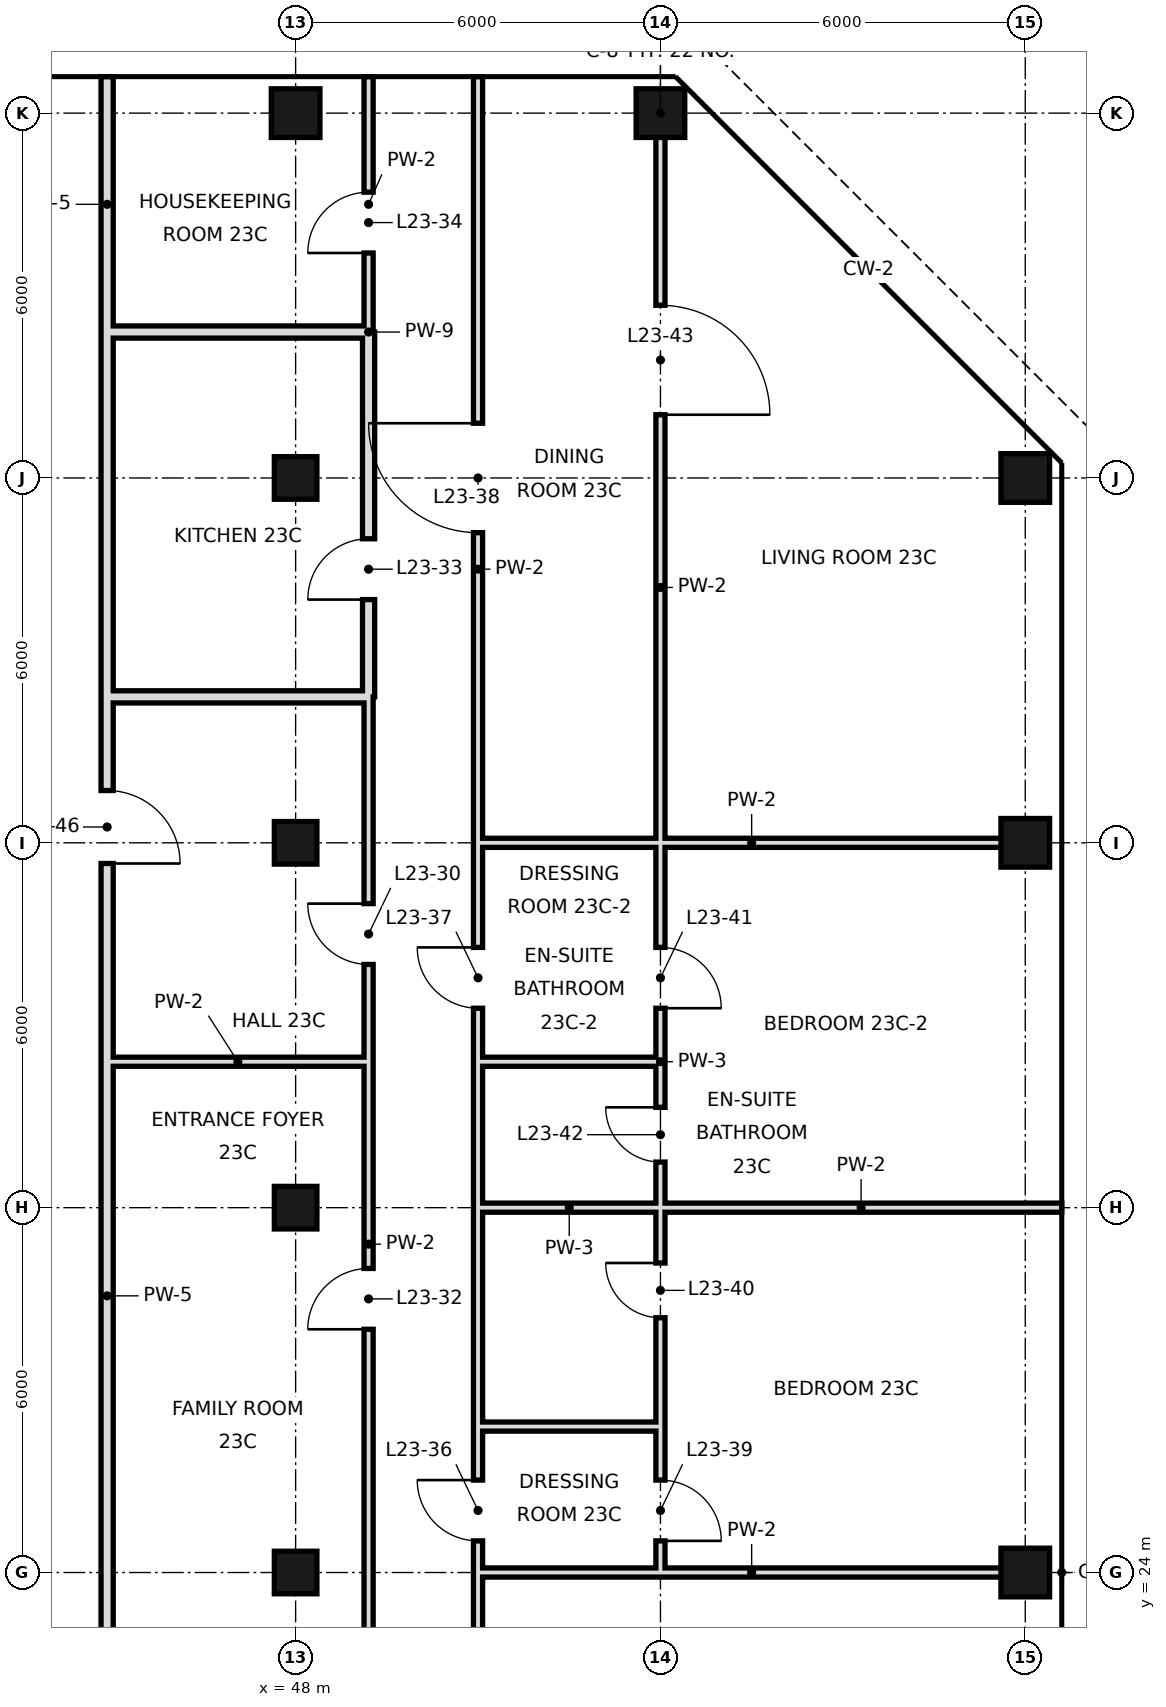
"""IFC4 building model, lengths in metres.
Left out: names, types, materials, properties, quantities, classifications, styles, units other than length and angle.
Written with IfcOpenShell. Run it as: python <this file> out.ifc"""

import sys

from ifc_helpers import new_model, si_unit, direction, frame, frame_2d, origin, origin_2d, place, context, subcontext, project, spatial, rectangle, hollow_rectangle, extrude, element, fill, save


model = new_model("IFC4")
c1 = context("Model", 3, precision=1e-05, world=origin(), true_north=direction((0.0, 1.0)))
c2 = subcontext(c1, "Body", "Model", "MODEL_VIEW")
j1 = project(units=[si_unit("LENGTHUNIT", "METRE"), si_unit("PLANEANGLEUNIT", "RADIAN")], contexts=[c1])
p1 = place(None, origin())
s1 = spatial("IfcSite", under=j1, at=p1, CompositionType="ELEMENT")
p2 = place(p1, origin())
s2 = spatial("IfcBuilding", under=s1, at=p2, CompositionType="ELEMENT")
p3 = place(p2, frame((0.0, 0.0, 107.0)))
s3 = spatial("IfcBuildingStorey", under=s2, at=p3, CompositionType="ELEMENT", Elevation=107.0)
for number, where, z_axis, x_axis in (
    (1, (48.0, 24.0, 0.0), (0.0, 0.0, 1.0), (1.0, 0.0, 0.0)),
    (2, (48.0, 30.0, 0.0), (0.0, 0.0, 1.0), (1.0, 0.0, 0.0)),
    (3, (48.0, 36.0, 0.0), (0.0, 0.0, 1.0), (1.0, 0.0, 0.0)),
    (4, (48.0, 42.0, 0.0), (0.0, 0.0, 1.0), (1.0, 0.0, 0.0)),
):
    element("IfcColumn", number, at=place(p3, frame(where, z_axis=z_axis, x_axis=x_axis)), inside=s3, PredefinedType="COLUMN", context=c2, shape_type="SweptSolid", body=[
        extrude(hollow_rectangle(XDim=0.7, YDim=0.7, WallThickness=0.036, at=origin_2d()), origin(), (0.0, 0.0, 1.0), 3.6),
    ])
for number, where, z_axis, x_axis in (
    (5, (48.0, 48.0, 0.0), (0.0, 0.0, 1.0), (1.0, 0.0, 0.0)),
    (6, (54.0, 48.0, 0.0), (0.0, 0.0, 1.0), (1.0, 0.0, 0.0)),
    (7, (60.0, 24.0, 0.0), (0.0, 0.0, 1.0), (1.0, 0.0, 0.0)),
    (8, (60.0, 36.0, 0.0), (0.0, 0.0, 1.0), (1.0, 0.0, 0.0)),
    (9, (60.0, 42.0, 0.0), (0.0, 0.0, 1.0), (1.0, 0.0, 0.0)),
):
    element("IfcColumn", number, at=place(p3, frame(where, z_axis=z_axis, x_axis=x_axis)), inside=s3, PredefinedType="COLUMN", context=c2, shape_type="SweptSolid", body=[
        extrude(hollow_rectangle(XDim=0.8, YDim=0.8, WallThickness=0.04, at=origin_2d()), origin(), (0.0, 0.0, 1.0), 3.6),
    ])
p4 = place(p3, frame((44.9, 18.7, 0.0), z_axis=(0.0, 0.0, 1.0), x_axis=(0.0, 1.0, 0.0)))
e10 = element("IfcWall", 10, at=p4, inside=s3, PredefinedType="SOLIDWALL", context=c2, shape_type="SweptSolid", body=[
    extrude(rectangle(XDim=19.7, YDim=0.2, at=frame_2d((9.85, 0.0))), origin(), (0.0, 0.0, 1.0), 2.97),
])
p5 = place(p4, frame((16.96, 0.0, 0.0)))
e11 = element("IfcOpeningElement", 11, at=p5, cuts=e10, PredefinedType="OPENING", context=c2, shape_type="SweptSolid", body=[
    extrude(rectangle(XDim=1.2, YDim=2.4, at=frame_2d((0.6, 1.2))), frame((0.0, 0.11, 0.0), z_axis=(0.0, -1.0, 0.0), x_axis=(1.0, 0.0, 0.0)), (0.0, 0.0, 1.0), 0.22),
])
p6 = place(p3, frame((44.9, 44.4, 0.0), z_axis=(0.0, 0.0, 1.0), x_axis=(0.0, 1.0, 0.0)))
e12 = element("IfcWall", 12, at=p6, inside=s3, PredefinedType="SOLIDWALL", context=c2, shape_type="SweptSolid", body=[
    extrude(rectangle(XDim=4.2, YDim=0.2, at=frame_2d((2.1, 0.0))), origin(), (0.0, 0.0, 1.0), 2.72),
])
p7 = place(p3, frame((44.9, 38.4, 0.0), z_axis=(0.0, 0.0, 1.0), x_axis=(0.0, 1.0, 0.0)))
e13 = element("IfcWall", 13, at=p7, inside=s3, PredefinedType="SOLIDWALL", context=c2, shape_type="SweptSolid", body=[
    extrude(rectangle(XDim=6.0, YDim=0.2, at=frame_2d((3.0, 0.0))), origin(), (0.0, 0.0, 1.0), 2.97),
])
p8 = place(p3, frame((49.2, 38.4, 0.0), z_axis=(0.0, 0.0, 1.0), x_axis=(0.0, 1.0, 0.0)))
e14 = element("IfcWall", 14, at=p8, inside=s3, PredefinedType="SOLIDWALL", context=c2, shape_type="SweptSolid", body=[
    extrude(rectangle(XDim=6.0, YDim=0.2, at=frame_2d((3.0, 0.0))), origin(), (0.0, 0.0, 1.0), 2.72),
])
p9 = place(p8, frame((1.6, 0.0, 0.0)))
e15 = element("IfcOpeningElement", 15, at=p9, cuts=e14, PredefinedType="OPENING", context=c2, shape_type="SweptSolid", body=[
    extrude(rectangle(XDim=1.0, YDim=2.4, at=frame_2d((0.5, 1.2))), frame((0.0, 0.11, 0.0), z_axis=(0.0, -1.0, 0.0), x_axis=(1.0, 0.0, 0.0)), (0.0, 0.0, 1.0), 0.22),
])
p10 = place(p3, frame((49.2, 20.4, 0.0), z_axis=(0.0, 0.0, 1.0), x_axis=(0.0, 1.0, 0.0)))
e16 = element("IfcWall", 16, at=p10, inside=s3, PredefinedType="PARTITIONING", context=c2, shape_type="SweptSolid", body=[
    extrude(rectangle(XDim=18.0, YDim=0.15, at=frame_2d((9.0, 0.0))), origin(), (0.0, 0.0, 1.0), 3.42),
])
p11 = place(p10, frame((13.6, 0.0, 0.0)))
e17 = element("IfcOpeningElement", 17, at=p11, cuts=e16, PredefinedType="OPENING", context=c2, shape_type="SweptSolid", body=[
    extrude(rectangle(XDim=1.0, YDim=2.4, at=frame_2d((0.5, 1.2))), frame((0.0, 0.085, 0.0), z_axis=(0.0, -1.0, 0.0), x_axis=(1.0, 0.0, 0.0)), (0.0, 0.0, 1.0), 0.17),
])
p12 = place(p10, frame((7.6, 0.0, 0.0)))
e18 = element("IfcOpeningElement", 18, at=p12, cuts=e16, PredefinedType="OPENING", context=c2, shape_type="SweptSolid", body=[
    extrude(rectangle(XDim=1.0, YDim=2.4, at=frame_2d((0.5, 1.2))), frame((0.0, 0.085, 0.0), z_axis=(0.0, -1.0, 0.0), x_axis=(1.0, 0.0, 0.0)), (0.0, 0.0, 1.0), 0.17),
])
p13 = place(p3, frame((49.2, 44.4, 0.0), z_axis=(0.0, 0.0, 1.0), x_axis=(0.0, 1.0, 0.0)))
e19 = element("IfcWall", 19, at=p13, inside=s3, PredefinedType="PARTITIONING", context=c2, shape_type="SweptSolid", body=[
    extrude(rectangle(XDim=4.2, YDim=0.15, at=frame_2d((2.1, 0.0))), origin(), (0.0, 0.0, 1.0), 3.42),
])
p14 = place(p13, frame((1.3, 0.0, 0.0)))
e20 = element("IfcOpeningElement", 20, at=p14, cuts=e19, PredefinedType="OPENING", context=c2, shape_type="SweptSolid", body=[
    extrude(rectangle(XDim=1.0, YDim=2.4, at=frame_2d((0.5, 1.2))), frame((0.0, 0.085, 0.0), z_axis=(0.0, -1.0, 0.0), x_axis=(1.0, 0.0, 0.0)), (0.0, 0.0, 1.0), 0.17),
])
p15 = place(p3, frame((51.0, 18.0, 0.0), z_axis=(0.0, 0.0, 1.0), x_axis=(0.0, 1.0, 0.0)))
e21 = element("IfcWall", 21, at=p15, inside=s3, PredefinedType="PARTITIONING", context=c2, shape_type="SweptSolid", body=[
    extrude(rectangle(XDim=8.4, YDim=0.15, at=frame_2d((4.2, 0.0))), origin(), (0.0, 0.0, 1.0), 3.42),
])
p16 = place(p15, frame((2.5, 0.0, 0.0)))
e22 = element("IfcOpeningElement", 22, at=p16, cuts=e21, PredefinedType="OPENING", context=c2, shape_type="SweptSolid", body=[
    extrude(rectangle(XDim=1.0, YDim=2.4, at=frame_2d((0.5, 1.2))), frame((0.0, 0.085, 0.0), z_axis=(0.0, -1.0, 0.0), x_axis=(1.0, 0.0, 0.0)), (0.0, 0.0, 1.0), 0.17),
])
p17 = place(p15, frame((6.52, 0.0, 0.0)))
e23 = element("IfcOpeningElement", 23, at=p17, cuts=e21, PredefinedType="OPENING", context=c2, shape_type="SweptSolid", body=[
    extrude(rectangle(XDim=1.0, YDim=2.4, at=frame_2d((0.5, 1.2))), frame((0.0, 0.085, 0.0), z_axis=(0.0, -1.0, 0.0), x_axis=(1.0, 0.0, 0.0)), (0.0, 0.0, 1.0), 0.17),
])
p18 = place(p3, frame((51.0, 32.4, 0.0), z_axis=(0.0, 0.0, 1.0), x_axis=(0.0, 1.0, 0.0)))
e24 = element("IfcWall", 24, at=p18, inside=s3, PredefinedType="PARTITIONING", context=c2, shape_type="SweptSolid", body=[
    extrude(rectangle(XDim=16.2, YDim=0.15, at=frame_2d((8.1, 0.0))), origin(), (0.0, 0.0, 1.0), 3.42),
])
p19 = place(p18, frame((0.88, 0.0, 0.0)))
e25 = element("IfcOpeningElement", 25, at=p19, cuts=e24, PredefinedType="OPENING", context=c2, shape_type="SweptSolid", body=[
    extrude(rectangle(XDim=1.0, YDim=2.4, at=frame_2d((0.5, 1.2))), frame((0.0, 0.085, 0.0), z_axis=(0.0, -1.0, 0.0), x_axis=(1.0, 0.0, 0.0)), (0.0, 0.0, 1.0), 0.17),
])
p20 = place(p18, frame((8.7, 0.0, 0.0)))
e26 = element("IfcOpeningElement", 26, at=p20, cuts=e24, PredefinedType="OPENING", context=c2, shape_type="SweptSolid", body=[
    extrude(rectangle(XDim=1.8, YDim=2.4, at=frame_2d((0.9, 1.2))), frame((0.0, 0.085, 0.0), z_axis=(0.0, -1.0, 0.0), x_axis=(1.0, 0.0, 0.0)), (0.0, 0.0, 1.0), 0.17),
])
p21 = place(p3, frame((51.0, 26.4, 0.0), z_axis=(0.0, 0.0, 1.0), x_axis=(0.0, 1.0, 0.0)))
e27 = element("IfcWall", 27, at=p21, inside=s3, PredefinedType="PARTITIONING", context=c2, shape_type="SweptSolid", body=[
    extrude(rectangle(XDim=6.0, YDim=0.15, at=frame_2d((3.0, 0.0))), origin(), (0.0, 0.0, 1.0), 3.42),
])
p22 = place(p3, frame((54.0, 24.0, 0.0), z_axis=(0.0, 0.0, 1.0), x_axis=(0.0, 1.0, 0.0)))
e28 = element("IfcWall", 28, at=p22, inside=s3, PredefinedType="PARTITIONING", context=c2, shape_type="SweptSolid", body=[
    extrude(rectangle(XDim=2.4, YDim=0.15, at=frame_2d((1.2, 0.0))), origin(), (0.0, 0.0, 1.0), 3.42),
])
p23 = place(p22, frame((0.52, 0.0, 0.0)))
e29 = element("IfcOpeningElement", 29, at=p23, cuts=e28, PredefinedType="OPENING", context=c2, shape_type="SweptSolid", body=[
    extrude(rectangle(XDim=1.0, YDim=2.4, at=frame_2d((0.5, 1.2))), frame((0.0, 0.085, 0.0), z_axis=(0.0, -1.0, 0.0), x_axis=(1.0, 0.0, 0.0)), (0.0, 0.0, 1.0), 0.17),
])
p24 = place(p3, frame((54.0, 32.4, 0.0), z_axis=(0.0, 0.0, 1.0), x_axis=(0.0, 1.0, 0.0)))
e30 = element("IfcWall", 30, at=p24, inside=s3, PredefinedType="PARTITIONING", context=c2, shape_type="SweptSolid", body=[
    extrude(rectangle(XDim=15.6, YDim=0.15, at=frame_2d((7.8, 0.0))), origin(), (0.0, 0.0, 1.0), 3.42),
])
p25 = place(p24, frame((0.88, 0.0, 0.0)))
e31 = element("IfcOpeningElement", 31, at=p25, cuts=e30, PredefinedType="OPENING", context=c2, shape_type="SweptSolid", body=[
    extrude(rectangle(XDim=1.0, YDim=2.4, at=frame_2d((0.5, 1.2))), frame((0.0, 0.085, 0.0), z_axis=(0.0, -1.0, 0.0), x_axis=(1.0, 0.0, 0.0)), (0.0, 0.0, 1.0), 0.17),
])
p26 = place(p24, frame((10.64, 0.0, 0.0)))
e32 = element("IfcOpeningElement", 32, at=p26, cuts=e30, PredefinedType="OPENING", context=c2, shape_type="SweptSolid", body=[
    extrude(rectangle(XDim=1.8, YDim=2.4, at=frame_2d((0.9, 1.2))), frame((0.0, 0.085, 0.0), z_axis=(0.0, -1.0, 0.0), x_axis=(1.0, 0.0, 0.0)), (0.0, 0.0, 1.0), 0.17),
])
p27 = place(p3, frame((54.0, 26.4, 0.0), z_axis=(0.0, 0.0, 1.0), x_axis=(0.0, 1.0, 0.0)))
e33 = element("IfcWall", 33, at=p27, inside=s3, PredefinedType="PARTITIONING", context=c2, shape_type="SweptSolid", body=[
    extrude(rectangle(XDim=6.0, YDim=0.15, at=frame_2d((3.0, 0.0))), origin(), (0.0, 0.0, 1.0), 3.42),
])
p28 = place(p27, frame((1.79, 0.0, 0.0)))
e34 = element("IfcOpeningElement", 34, at=p28, cuts=e33, PredefinedType="OPENING", context=c2, shape_type="SweptSolid", body=[
    extrude(rectangle(XDim=0.9, YDim=2.4, at=frame_2d((0.45, 1.2))), frame((0.0, 0.085, 0.0), z_axis=(0.0, -1.0, 0.0), x_axis=(1.0, 0.0, 0.0)), (0.0, 0.0, 1.0), 0.17),
])
p29 = place(p27, frame((4.35, 0.0, 0.0)))
e35 = element("IfcOpeningElement", 35, at=p29, cuts=e33, PredefinedType="OPENING", context=c2, shape_type="SweptSolid", body=[
    extrude(rectangle(XDim=0.9, YDim=2.4, at=frame_2d((0.45, 1.2))), frame((0.0, 0.085, 0.0), z_axis=(0.0, -1.0, 0.0), x_axis=(1.0, 0.0, 0.0)), (0.0, 0.0, 1.0), 0.17),
])
p30 = place(p3, frame((51.0, 24.0, 0.0), z_axis=(0.0, 0.0, 1.0), x_axis=(1.0, 0.0, 0.0)))
e36 = element("IfcWall", 36, at=p30, inside=s3, PredefinedType="PARTITIONING", context=c2, shape_type="SweptSolid", body=[
    extrude(rectangle(XDim=9.0, YDim=0.15, at=frame_2d((4.5, 0.0))), origin(), (0.0, 0.0, 1.0), 2.72),
])
p31 = place(p3, frame((51.0, 26.4, 0.0), z_axis=(0.0, 0.0, 1.0), x_axis=(1.0, 0.0, 0.0)))
e37 = element("IfcWall", 37, at=p31, inside=s3, PredefinedType="PARTITIONING", context=c2, shape_type="SweptSolid", body=[
    extrude(rectangle(XDim=3.0, YDim=0.15, at=frame_2d((1.5, 0.0))), origin(), (0.0, 0.0, 1.0), 3.42),
])
p32 = place(p3, frame((54.0, 30.0, 0.0), z_axis=(0.0, 0.0, 1.0), x_axis=(1.0, 0.0, 0.0)))
e38 = element("IfcWall", 38, at=p32, inside=s3, PredefinedType="PARTITIONING", context=c2, shape_type="SweptSolid", body=[
    extrude(rectangle(XDim=6.6, YDim=0.15, at=frame_2d((3.3, 0.0))), origin(), (0.0, 0.0, 1.0), 2.72),
])
p33 = place(p3, frame((51.0, 30.0, 0.0), z_axis=(0.0, 0.0, 1.0), x_axis=(1.0, 0.0, 0.0)))
e39 = element("IfcWall", 39, at=p33, inside=s3, PredefinedType="PARTITIONING", context=c2, shape_type="SweptSolid", body=[
    extrude(rectangle(XDim=3.0, YDim=0.15, at=frame_2d((1.5, 0.0))), origin(), (0.0, 0.0, 1.0), 2.72),
])
p34 = place(p3, frame((44.9, 32.4, 0.0), z_axis=(0.0, 0.0, 1.0), x_axis=(1.0, 0.0, 0.0)))
e40 = element("IfcWall", 40, at=p34, inside=s3, PredefinedType="PARTITIONING", context=c2, shape_type="SweptSolid", body=[
    extrude(rectangle(XDim=4.3, YDim=0.15, at=frame_2d((2.15, 0.0))), origin(), (0.0, 0.0, 1.0), 3.42),
])
p35 = place(p3, frame((51.0, 32.4, 0.0), z_axis=(0.0, 0.0, 1.0), x_axis=(1.0, 0.0, 0.0)))
e41 = element("IfcWall", 41, at=p35, inside=s3, PredefinedType="PARTITIONING", context=c2, shape_type="SweptSolid", body=[
    extrude(rectangle(XDim=3.0, YDim=0.15, at=frame_2d((1.5, 0.0))), origin(), (0.0, 0.0, 1.0), 3.42),
])
p36 = place(p3, frame((51.0, 36.0, 0.0), z_axis=(0.0, 0.0, 1.0), x_axis=(1.0, 0.0, 0.0)))
e42 = element("IfcWall", 42, at=p36, inside=s3, PredefinedType="PARTITIONING", context=c2, shape_type="SweptSolid", body=[
    extrude(rectangle(XDim=9.0, YDim=0.15, at=frame_2d((4.5, 0.0))), origin(), (0.0, 0.0, 1.0), 2.72),
])
for number, where, z_axis, x_axis in (
    (43, (44.9, 38.4, 0.0), (0.0, 0.0, 1.0), (1.0, 0.0, 0.0)),
    (44, (44.9, 44.4, 0.0), (0.0, 0.0, 1.0), (1.0, 0.0, 0.0)),
):
    element("IfcWall", number, at=place(p3, frame(where, z_axis=z_axis, x_axis=x_axis)), inside=s3, PredefinedType="SOLIDWALL", context=c2, shape_type="SweptSolid", body=[
        extrude(rectangle(XDim=4.3, YDim=0.2, at=frame_2d((2.15, 0.0))), origin(), (0.0, 0.0, 1.0), 2.97),
    ])
p37 = place(p11, frame((1.0, 0.0, 0.0), z_axis=(0.0, 0.0, 1.0), x_axis=(-1.0, 0.0, 0.0)))
e45 = element("IfcDoor", 45, at=p37, inside=s3, OperationType="SINGLE_SWING_LEFT", PredefinedType="DOOR", context=c2, shape_type="SweptSolid", body=[
    extrude(rectangle(XDim=1.0, YDim=2.4, at=frame_2d((0.5, 1.2))), frame((0.0, 0.025, 0.0), z_axis=(0.0, -1.0, 0.0), x_axis=(1.0, 0.0, 0.0)), (0.0, 0.0, 1.0), 0.05),
])
fill(e17, e45)
p38 = place(p12, origin())
e46 = element("IfcDoor", 46, at=p38, inside=s3, OperationType="SINGLE_SWING_LEFT", PredefinedType="DOOR", context=c2, shape_type="SweptSolid", body=[
    extrude(rectangle(XDim=1.0, YDim=2.4, at=frame_2d((0.5, 1.2))), frame((0.0, 0.025, 0.0), z_axis=(0.0, -1.0, 0.0), x_axis=(1.0, 0.0, 0.0)), (0.0, 0.0, 1.0), 0.05),
])
fill(e18, e46)
p39 = place(p9, origin())
e47 = element("IfcDoor", 47, at=p39, inside=s3, OperationType="SINGLE_SWING_LEFT", PredefinedType="DOOR", context=c2, shape_type="SweptSolid", body=[
    extrude(rectangle(XDim=1.0, YDim=2.4, at=frame_2d((0.5, 1.2))), frame((0.0, 0.025, 0.0), z_axis=(0.0, -1.0, 0.0), x_axis=(1.0, 0.0, 0.0)), (0.0, 0.0, 1.0), 0.05),
])
fill(e15, e47)
p40 = place(p14, origin())
e48 = element("IfcDoor", 48, at=p40, inside=s3, OperationType="SINGLE_SWING_LEFT", PredefinedType="DOOR", context=c2, shape_type="SweptSolid", body=[
    extrude(rectangle(XDim=1.0, YDim=2.4, at=frame_2d((0.5, 1.2))), frame((0.0, 0.025, 0.0), z_axis=(0.0, -1.0, 0.0), x_axis=(1.0, 0.0, 0.0)), (0.0, 0.0, 1.0), 0.05),
])
fill(e20, e48)
p41 = place(p17, frame((1.0, 0.0, 0.0), z_axis=(0.0, 0.0, 1.0), x_axis=(-1.0, 0.0, 0.0)))
e49 = element("IfcDoor", 49, at=p41, inside=s3, OperationType="SINGLE_SWING_LEFT", PredefinedType="DOOR", context=c2, shape_type="SweptSolid", body=[
    extrude(rectangle(XDim=1.0, YDim=2.4, at=frame_2d((0.5, 1.2))), frame((0.0, 0.025, 0.0), z_axis=(0.0, -1.0, 0.0), x_axis=(1.0, 0.0, 0.0)), (0.0, 0.0, 1.0), 0.05),
])
fill(e23, e49)
p42 = place(p19, frame((1.0, 0.0, 0.0), z_axis=(0.0, 0.0, 1.0), x_axis=(-1.0, 0.0, 0.0)))
e50 = element("IfcDoor", 50, at=p42, inside=s3, OperationType="SINGLE_SWING_LEFT", PredefinedType="DOOR", context=c2, shape_type="SweptSolid", body=[
    extrude(rectangle(XDim=1.0, YDim=2.4, at=frame_2d((0.5, 1.2))), frame((0.0, 0.025, 0.0), z_axis=(0.0, -1.0, 0.0), x_axis=(1.0, 0.0, 0.0)), (0.0, 0.0, 1.0), 0.05),
])
fill(e25, e50)
p43 = place(p20, frame((1.8, 0.0, 0.0), z_axis=(0.0, 0.0, 1.0), x_axis=(-1.0, 0.0, 0.0)))
e51 = element("IfcDoor", 51, at=p43, inside=s3, OperationType="SINGLE_SWING_LEFT", PredefinedType="DOOR", context=c2, shape_type="SweptSolid", body=[
    extrude(rectangle(XDim=1.8, YDim=2.4, at=frame_2d((0.9, 1.2))), frame((0.0, 0.025, 0.0), z_axis=(0.0, -1.0, 0.0), x_axis=(1.0, 0.0, 0.0)), (0.0, 0.0, 1.0), 0.05),
])
fill(e26, e51)
p44 = place(p23, frame((1.0, 0.0, 0.0), z_axis=(0.0, 0.0, 1.0), x_axis=(-1.0, 0.0, 0.0)))
e52 = element("IfcDoor", 52, at=p44, inside=s3, OperationType="SINGLE_SWING_RIGHT", PredefinedType="DOOR", context=c2, shape_type="SweptSolid", body=[
    extrude(rectangle(XDim=1.0, YDim=2.4, at=frame_2d((0.5, 1.2))), frame((0.0, 0.025, 0.0), z_axis=(0.0, -1.0, 0.0), x_axis=(1.0, 0.0, 0.0)), (0.0, 0.0, 1.0), 0.05),
])
fill(e29, e52)
p45 = place(p28, frame((0.9, 0.0, 0.0), z_axis=(0.0, 0.0, 1.0), x_axis=(-1.0, 0.0, 0.0)))
e53 = element("IfcDoor", 53, at=p45, inside=s3, OperationType="SINGLE_SWING_LEFT", PredefinedType="DOOR", context=c2, shape_type="SweptSolid", body=[
    extrude(rectangle(XDim=0.9, YDim=2.4, at=frame_2d((0.45, 1.2))), frame((0.0, 0.025, 0.0), z_axis=(0.0, -1.0, 0.0), x_axis=(1.0, 0.0, 0.0)), (0.0, 0.0, 1.0), 0.05),
])
fill(e34, e53)
p46 = place(p25, frame((1.0, 0.0, 0.0), z_axis=(0.0, 0.0, 1.0), x_axis=(-1.0, 0.0, 0.0)))
e54 = element("IfcDoor", 54, at=p46, inside=s3, OperationType="SINGLE_SWING_RIGHT", PredefinedType="DOOR", context=c2, shape_type="SweptSolid", body=[
    extrude(rectangle(XDim=1.0, YDim=2.4, at=frame_2d((0.5, 1.2))), frame((0.0, 0.025, 0.0), z_axis=(0.0, -1.0, 0.0), x_axis=(1.0, 0.0, 0.0)), (0.0, 0.0, 1.0), 0.05),
])
fill(e31, e54)
p47 = place(p29, frame((0.9, 0.0, 0.0), z_axis=(0.0, 0.0, 1.0), x_axis=(-1.0, 0.0, 0.0)))
e55 = element("IfcDoor", 55, at=p47, inside=s3, OperationType="SINGLE_SWING_LEFT", PredefinedType="DOOR", context=c2, shape_type="SweptSolid", body=[
    extrude(rectangle(XDim=0.9, YDim=2.4, at=frame_2d((0.45, 1.2))), frame((0.0, 0.025, 0.0), z_axis=(0.0, -1.0, 0.0), x_axis=(1.0, 0.0, 0.0)), (0.0, 0.0, 1.0), 0.05),
])
fill(e35, e55)
p48 = place(p26, frame((1.8, 0.0, 0.0), z_axis=(0.0, 0.0, 1.0), x_axis=(-1.0, 0.0, 0.0)))
e56 = element("IfcDoor", 56, at=p48, inside=s3, OperationType="SINGLE_SWING_RIGHT", PredefinedType="DOOR", context=c2, shape_type="SweptSolid", body=[
    extrude(rectangle(XDim=1.8, YDim=2.4, at=frame_2d((0.9, 1.2))), frame((0.0, 0.025, 0.0), z_axis=(0.0, -1.0, 0.0), x_axis=(1.0, 0.0, 0.0)), (0.0, 0.0, 1.0), 0.05),
])
fill(e32, e56)
p49 = place(p5, frame((1.2, 0.0, 0.0), z_axis=(0.0, 0.0, 1.0), x_axis=(-1.0, 0.0, 0.0)))
e57 = element("IfcDoor", 57, at=p49, inside=s3, OperationType="SINGLE_SWING_RIGHT", PredefinedType="DOOR", context=c2, shape_type="SweptSolid", body=[
    extrude(rectangle(XDim=1.2, YDim=2.4, at=frame_2d((0.6, 1.2))), frame((0.0, 0.025, 0.0), z_axis=(0.0, -1.0, 0.0), x_axis=(1.0, 0.0, 0.0)), (0.0, 0.0, 1.0), 0.05),
])
fill(e11, e57)
save(model, sys.argv[1])
